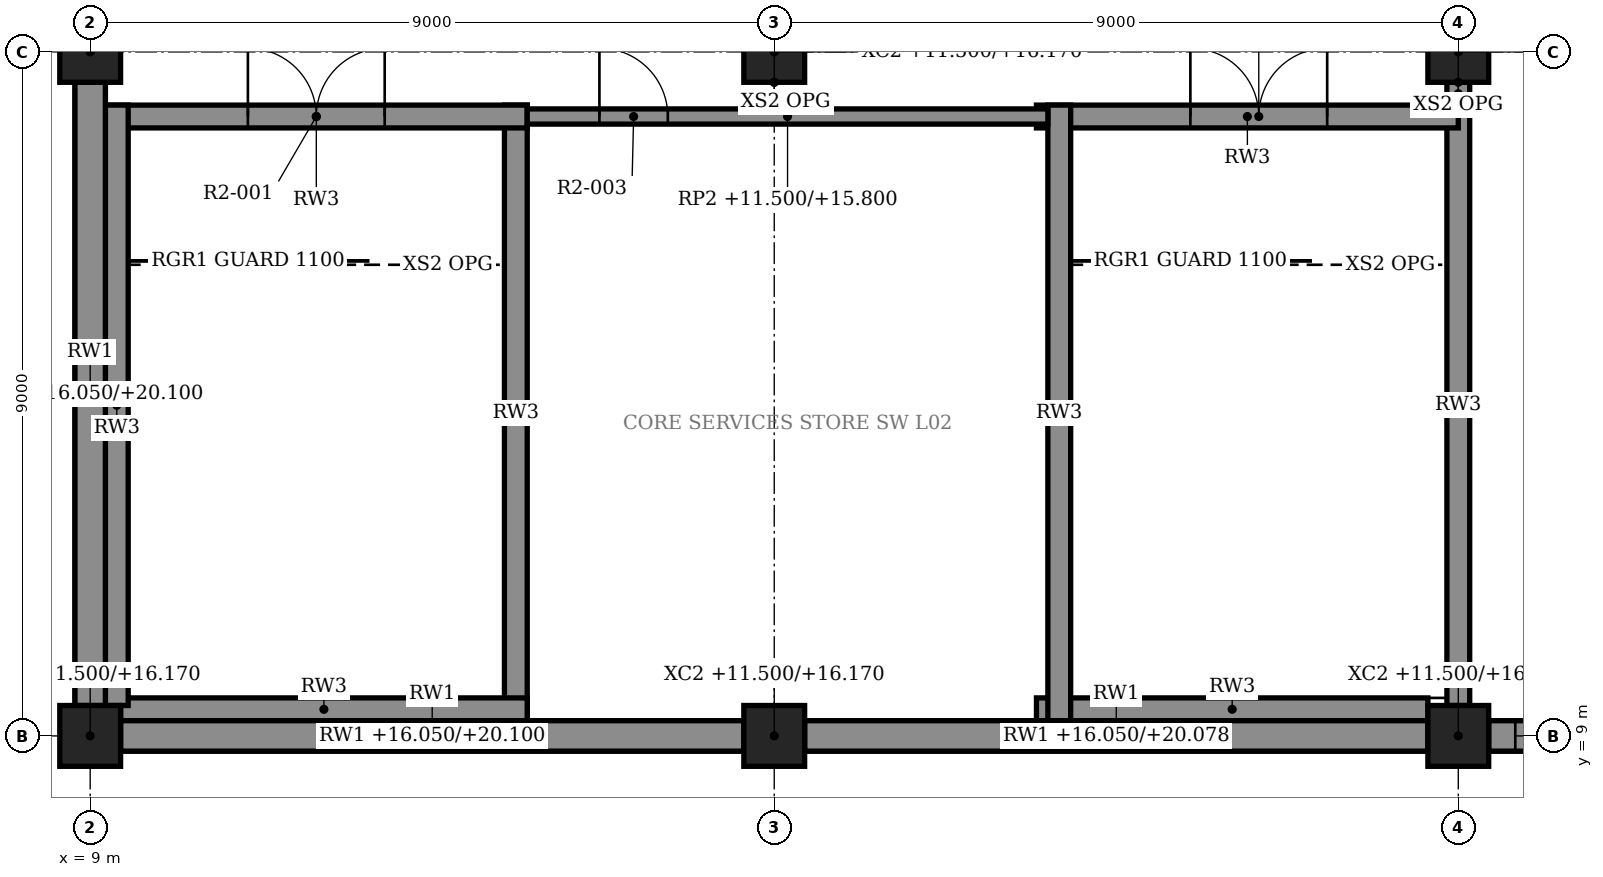
"""IFC4 building model, lengths in metres.
Left out: names, types, materials, properties, quantities, classifications, styles, units other than length and angle.
Written with IfcOpenShell. Run it as: python <this file> out.ifc"""

import sys

from ifc_helpers import new_model, si_unit, direction, frame, frame_2d, origin, origin_2d, place, context, subcontext, project, spatial, polyline, rectangle, outline, extrude, element, fill, save


model = new_model("IFC4")
c1 = context("Model", 3, precision=1e-05, world=origin(), true_north=direction((0.0, 1.0)))
c2 = subcontext(c1, "Body", "Model", "MODEL_VIEW")
j1 = project(units=[si_unit("LENGTHUNIT", "METRE"), si_unit("PLANEANGLEUNIT", "RADIAN")], contexts=[c1])
p1 = place(None, origin())
s1 = spatial("IfcSite", under=j1, at=p1, CompositionType="ELEMENT")
p2 = place(p1, origin())
s2 = spatial("IfcBuilding", under=s1, at=p2, CompositionType="ELEMENT")
p3 = place(p2, frame((0.0, 0.0, 11.5)))
s3 = spatial("IfcBuildingStorey", under=s2, at=p3, CompositionType="ELEMENT", Elevation=11.5)
for number, where, z_axis, x_axis in (
    (1, (9.0, 9.0, 0.0), (0.0, 0.0, 1.0), (1.0, 0.0, 0.0)),
    (2, (9.0, 18.0, 0.0), (0.0, 0.0, 1.0), (1.0, 0.0, 0.0)),
    (3, (18.0, 9.0, 0.0), (0.0, 0.0, 1.0), (1.0, 0.0, 0.0)),
    (4, (18.0, 18.0, 0.0), (0.0, 0.0, 1.0), (1.0, 0.0, 0.0)),
    (5, (27.0, 9.0, 0.0), (0.0, 0.0, 1.0), (1.0, 0.0, 0.0)),
    (6, (27.0, 18.0, 0.0), (0.0, 0.0, 1.0), (1.0, 0.0, 0.0)),
):
    element("IfcColumn", number, at=place(p3, frame(where, z_axis=z_axis, x_axis=x_axis)), inside=s3, PredefinedType="COLUMN", context=c2, shape_type="SweptSolid", body=[
        extrude(rectangle(XDim=0.8, YDim=0.8, at=origin_2d()), origin(), (0.0, 0.0, 1.0), 4.67),
    ])
p4 = place(p3, frame((9.0, 9.0, 4.55), z_axis=(0.0, 0.0, 1.0), x_axis=(1.0, 0.0, 0.0)))
e7 = element("IfcWall", 7, at=p4, inside=s3, PredefinedType="SOLIDWALL", context=c2, shape_type="SweptSolid", body=[
    extrude(outline(polyline([(0.0, 0.0), (9.0, 0.0), (9.0, 1.55), (8.961, 1.55), (4.461, 4.05), (0.0, 4.05), (0.0, 0.0)])), frame((0.0, 0.2, 0.0), z_axis=(0.0, -1.0, 0.0), x_axis=(1.0, 0.0, 0.0)), (0.0, 0.0, 1.0), 0.4),
])
p5 = place(p3, frame((18.0, 9.0, 4.55), z_axis=(0.0, 0.0, 1.0), x_axis=(1.0, 0.0, 0.0)))
e8 = element("IfcWall", 8, at=p5, inside=s3, PredefinedType="SOLIDWALL", context=c2, shape_type="SweptSolid", body=[
    extrude(outline(polyline([(0.0, 0.0), (9.0, 0.0), (9.0, 4.028), (4.539, 1.55), (0.0, 1.55), (0.0, 0.0)])), frame((0.0, 0.2, 0.0), z_axis=(0.0, -1.0, 0.0), x_axis=(1.0, 0.0, 0.0)), (0.0, 0.0, 1.0), 0.4),
])
p6 = place(p3, frame((27.0, 9.0, 4.55), z_axis=(0.0, 0.0, 1.0), x_axis=(1.0, 0.0, 0.0)))
e9 = element("IfcWall", 9, at=p6, inside=s3, PredefinedType="SOLIDWALL", context=c2, shape_type="SweptSolid", body=[
    extrude(outline(polyline([(0.0, 0.0), (9.0, 0.0), (9.0, 1.55), (8.961, 1.55), (4.461, 4.05), (0.039, 4.05), (0.0, 4.028), (0.0, 0.0)])), frame((0.0, 0.2, 0.0), z_axis=(0.0, -1.0, 0.0), x_axis=(1.0, 0.0, 0.0)), (0.0, 0.0, 1.0), 0.4),
])
p7 = place(p3, frame((9.0, 9.0, 4.55), z_axis=(0.0, 0.0, 1.0), x_axis=(0.0, 1.0, 0.0)))
e10 = element("IfcWall", 10, at=p7, inside=s3, PredefinedType="SOLIDWALL", context=c2, shape_type="SweptSolid", body=[
    extrude(rectangle(XDim=9.0, YDim=0.4, at=frame_2d((4.5, 0.0))), origin(), (0.0, 0.0, 1.0), 4.05),
])
for number, where, z_axis, x_axis in (
    (11, (9.4, 9.0, 0.0), (0.0, 0.0, 1.0), (1.0, 0.0, 0.0)),
    (12, (18.4, 9.0, 0.0), (0.0, 0.0, 1.0), (1.0, 0.0, 0.0)),
):
    element("IfcWall", number, at=place(p3, frame(where, z_axis=z_axis, x_axis=x_axis)), inside=s3, PredefinedType="SOLIDWALL", context=c2, shape_type="SweptSolid", body=[
        extrude(rectangle(XDim=8.2, YDim=0.4, at=frame_2d((4.1, 0.0))), origin(), (0.0, 0.0, 1.0), 4.55),
    ])
p8 = place(p3, frame((27.4, 9.0, 0.0), z_axis=(0.0, 0.0, 1.0), x_axis=(1.0, 0.0, 0.0)))
e13 = element("IfcWall", 13, at=p8, inside=s3, PredefinedType="SOLIDWALL", context=c2, shape_type="SweptSolid", body=[
    extrude(rectangle(XDim=8.2, YDim=0.4, at=frame_2d((4.1, 0.0))), origin(), (0.0, 0.0, 1.0), 4.55),
])
p9 = place(p8, frame((0.35, 0.0, 0.9)))
e14 = element("IfcOpeningElement", 14, at=p9, cuts=e13, PredefinedType="OPENING", context=c2, shape_type="SweptSolid", body=[
    extrude(rectangle(XDim=1.5, YDim=2.4, at=frame_2d((0.75, 1.2))), frame((0.0, 0.21, 0.0), z_axis=(0.0, -1.0, 0.0), x_axis=(1.0, 0.0, 0.0)), (0.0, 0.0, 1.0), 0.42),
])
p10 = place(p8, frame((6.35, 0.0, 0.9)))
e15 = element("IfcOpeningElement", 15, at=p10, cuts=e13, PredefinedType="OPENING", context=c2, shape_type="SweptSolid", body=[
    extrude(rectangle(XDim=1.5, YDim=2.4, at=frame_2d((0.75, 1.2))), frame((0.0, 0.21, 0.0), z_axis=(0.0, -1.0, 0.0), x_axis=(1.0, 0.0, 0.0)), (0.0, 0.0, 1.0), 0.42),
])
p11 = place(p3, frame((9.0, 9.4, 0.0), z_axis=(0.0, 0.0, 1.0), x_axis=(0.0, 1.0, 0.0)))
e16 = element("IfcWall", 16, at=p11, inside=s3, PredefinedType="SOLIDWALL", context=c2, shape_type="SweptSolid", body=[
    extrude(rectangle(XDim=8.2, YDim=0.4, at=frame_2d((4.1, 0.0))), origin(), (0.0, 0.0, 1.0), 4.55),
])
p12 = place(p3, frame((9.4, 9.35, 0.0), z_axis=(0.0, 0.0, 1.0), x_axis=(1.0, 0.0, 0.0)))
e17 = element("IfcWall", 17, at=p12, inside=s3, PredefinedType="SOLIDWALL", context=c2, shape_type="SweptSolid", body=[
    extrude(rectangle(XDim=5.35, YDim=0.3, at=frame_2d((2.675, 0.0))), origin(), (0.0, 0.0, 1.0), 4.3),
])
p13 = place(p3, frame((9.2, 17.15, 0.0), z_axis=(0.0, 0.0, 1.0), x_axis=(1.0, 0.0, 0.0)))
e18 = element("IfcWall", 18, at=p13, inside=s3, PredefinedType="SOLIDWALL", context=c2, shape_type="SweptSolid", body=[
    extrude(rectangle(XDim=5.55, YDim=0.3, at=frame_2d((2.775, 0.0))), origin(), (0.0, 0.0, 1.0), 4.3),
])
p14 = place(p13, frame((1.875, 0.0, 0.0)))
e19 = element("IfcOpeningElement", 19, at=p14, cuts=e18, PredefinedType="OPENING", context=c2, shape_type="SweptSolid", body=[
    extrude(rectangle(XDim=1.8, YDim=2.4, at=frame_2d((0.9, 1.2))), frame((0.0, 0.16, 0.0), z_axis=(0.0, -1.0, 0.0), x_axis=(1.0, 0.0, 0.0)), (0.0, 0.0, 1.0), 0.32),
])
p15 = place(p3, frame((9.35, 9.4, 0.0), z_axis=(0.0, 0.0, 1.0), x_axis=(0.0, 1.0, 0.0)))
e20 = element("IfcWall", 20, at=p15, inside=s3, PredefinedType="SOLIDWALL", context=c2, shape_type="SweptSolid", body=[
    extrude(rectangle(XDim=7.9, YDim=0.3, at=frame_2d((3.95, 0.0))), origin(), (0.0, 0.0, 1.0), 4.3),
])
p16 = place(p3, frame((14.6, 9.2, 0.0), z_axis=(0.0, 0.0, 1.0), x_axis=(0.0, 1.0, 0.0)))
e21 = element("IfcWall", 21, at=p16, inside=s3, PredefinedType="SOLIDWALL", context=c2, shape_type="SweptSolid", body=[
    extrude(rectangle(XDim=8.1, YDim=0.3, at=frame_2d((4.05, 0.0))), origin(), (0.0, 0.0, 1.0), 4.3),
])
p17 = place(p3, frame((21.45, 9.35, 0.0), z_axis=(0.0, 0.0, 1.0), x_axis=(1.0, 0.0, 0.0)))
e22 = element("IfcWall", 22, at=p17, inside=s3, PredefinedType="SOLIDWALL", context=c2, shape_type="SweptSolid", body=[
    extrude(rectangle(XDim=5.15, YDim=0.3, at=frame_2d((2.575, 0.0))), origin(), (0.0, 0.0, 1.0), 4.3),
])
p18 = place(p3, frame((21.45, 17.15, 0.0), z_axis=(0.0, 0.0, 1.0), x_axis=(1.0, 0.0, 0.0)))
e23 = element("IfcWall", 23, at=p18, inside=s3, PredefinedType="SOLIDWALL", context=c2, shape_type="SweptSolid", body=[
    extrude(rectangle(XDim=5.55, YDim=0.3, at=frame_2d((2.775, 0.0))), origin(), (0.0, 0.0, 1.0), 4.3),
])
p19 = place(p18, frame((2.025, 0.0, 0.0)))
e24 = element("IfcOpeningElement", 24, at=p19, cuts=e23, PredefinedType="OPENING", context=c2, shape_type="SweptSolid", body=[
    extrude(rectangle(XDim=1.8, YDim=2.4, at=frame_2d((0.9, 1.2))), frame((0.0, 0.16, 0.0), z_axis=(0.0, -1.0, 0.0), x_axis=(1.0, 0.0, 0.0)), (0.0, 0.0, 1.0), 0.32),
])
p20 = place(p3, frame((21.75, 9.2, 0.0), z_axis=(0.0, 0.0, 1.0), x_axis=(0.0, 1.0, 0.0)))
e25 = element("IfcWall", 25, at=p20, inside=s3, PredefinedType="SOLIDWALL", context=c2, shape_type="SweptSolid", body=[
    extrude(rectangle(XDim=8.1, YDim=0.3, at=frame_2d((4.05, 0.0))), origin(), (0.0, 0.0, 1.0), 4.3),
])
p21 = place(p3, frame((27.0, 9.4, 0.0), z_axis=(0.0, 0.0, 1.0), x_axis=(0.0, 1.0, 0.0)))
e26 = element("IfcWall", 26, at=p21, inside=s3, PredefinedType="SOLIDWALL", context=c2, shape_type="SweptSolid", body=[
    extrude(rectangle(XDim=7.9, YDim=0.3, at=frame_2d((3.95, 0.0))), origin(), (0.0, 0.0, 1.0), 4.3),
])
p22 = place(p3, frame((14.75, 17.15, 0.0), z_axis=(0.0, 0.0, 1.0), x_axis=(1.0, 0.0, 0.0)))
e27 = element("IfcWall", 27, at=p22, inside=s3, PredefinedType="PARTITIONING", context=c2, shape_type="SweptSolid", body=[
    extrude(rectangle(XDim=6.85, YDim=0.2, at=frame_2d((3.425, 0.0))), origin(), (0.0, 0.0, 1.0), 4.3),
])
p23 = place(p22, frame((0.95, 0.0, 0.0)))
e28 = element("IfcOpeningElement", 28, at=p23, cuts=e27, PredefinedType="OPENING", context=c2, shape_type="SweptSolid", body=[
    extrude(rectangle(XDim=0.9, YDim=2.1, at=frame_2d((0.45, 1.05))), frame((0.0, 0.11, 0.0), z_axis=(0.0, -1.0, 0.0), x_axis=(1.0, 0.0, 0.0)), (0.0, 0.0, 1.0), 0.22),
])
p24 = place(p3, frame((27.0, 17.3, 0.0), z_axis=(0.0, 0.0, 1.0), x_axis=(0.0, 1.0, 0.0)))
e29 = element("IfcWall", 29, at=p24, inside=s3, PredefinedType="SOLIDWALL", context=c2, shape_type="SweptSolid", body=[
    extrude(rectangle(XDim=0.3, YDim=0.3, at=frame_2d((0.15, 0.0))), origin(), (0.0, 0.0, 1.0), 4.3),
])
p25 = place(p9, origin())
e30 = element("IfcWindow", 30, at=p25, inside=s3, PartitioningType="SINGLE_PANEL", PredefinedType="WINDOW", context=c2, shape_type="SweptSolid", body=[
    extrude(rectangle(XDim=1.5, YDim=2.4, at=frame_2d((0.75, 1.2))), frame((0.0, 0.03, 0.0), z_axis=(0.0, -1.0, 0.0), x_axis=(1.0, 0.0, 0.0)), (0.0, 0.0, 1.0), 0.06),
])
fill(e14, e30)
p26 = place(p14, origin())
e31 = element("IfcDoor", 31, at=p26, inside=s3, OperationType="DOUBLE_DOOR_SINGLE_SWING", PredefinedType="DOOR", context=c2, shape_type="SweptSolid", body=[
    extrude(rectangle(XDim=1.8, YDim=2.4, at=frame_2d((0.9, 1.2))), frame((0.0, 0.025, 0.0), z_axis=(0.0, -1.0, 0.0), x_axis=(1.0, 0.0, 0.0)), (0.0, 0.0, 1.0), 0.05),
])
fill(e19, e31)
p27 = place(p19, origin())
e32 = element("IfcDoor", 32, at=p27, inside=s3, OperationType="DOUBLE_DOOR_SINGLE_SWING", PredefinedType="DOOR", context=c2, shape_type="SweptSolid", body=[
    extrude(rectangle(XDim=1.8, YDim=2.4, at=frame_2d((0.9, 1.2))), frame((0.0, 0.025, 0.0), z_axis=(0.0, -1.0, 0.0), x_axis=(1.0, 0.0, 0.0)), (0.0, 0.0, 1.0), 0.05),
])
fill(e24, e32)
p28 = place(p23, origin())
e33 = element("IfcDoor", 33, at=p28, inside=s3, OperationType="SINGLE_SWING_LEFT", PredefinedType="DOOR", context=c2, shape_type="SweptSolid", body=[
    extrude(rectangle(XDim=0.9, YDim=2.1, at=frame_2d((0.45, 1.05))), frame((0.0, 0.025, 0.0), z_axis=(0.0, -1.0, 0.0), x_axis=(1.0, 0.0, 0.0)), (0.0, 0.0, 1.0), 0.05),
])
fill(e28, e33)
save(model, sys.argv[1])
